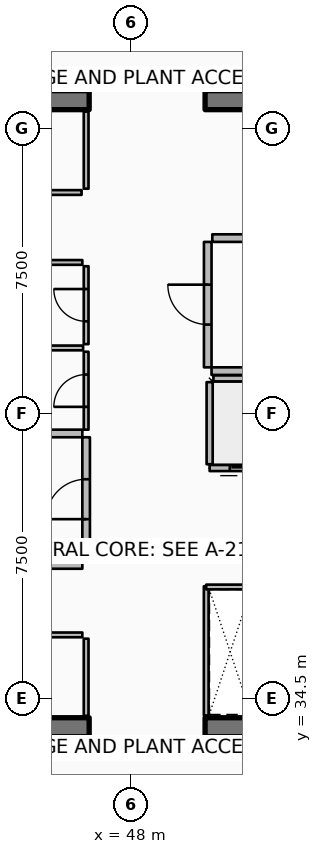
"""IFC4 building model, lengths in metres.
Left out: names, types, materials, properties, quantities, classifications, styles, units other than length and angle.
Written with IfcOpenShell. Run it as: python <this file> out.ifc"""

import sys

from ifc_helpers import new_model, si_unit, direction, frame, frame_2d, origin, place, context, subcontext, project, spatial, rectangle, extrude, element, fill, save


model = new_model("IFC4")
c1 = context("Model", 3, precision=1e-05, world=origin(), true_north=direction((0.0, 1.0)))
c2 = subcontext(c1, "Body", "Model", "MODEL_VIEW")
j1 = project(units=[si_unit("LENGTHUNIT", "METRE"), si_unit("PLANEANGLEUNIT", "RADIAN")], contexts=[c1])
p1 = place(None, origin())
s1 = spatial("IfcSite", under=j1, at=p1, CompositionType="ELEMENT")
p2 = place(p1, origin())
s2 = spatial("IfcBuilding", under=s1, at=p2, CompositionType="ELEMENT")
p3 = place(p2, frame((0.0, 0.0, 343.1)))
s3 = spatial("IfcBuildingStorey", under=s2, at=p3, CompositionType="ELEMENT", Elevation=343.1)
p4 = place(p3, frame((37.3, 33.75, 0.0), z_axis=(0.0, 0.0, 1.0), x_axis=(1.0, 0.0, 0.0)))
e1 = element("IfcWall", 1, at=p4, inside=s3, PredefinedType="SHEAR", context=c2, shape_type="SweptSolid", body=[
    extrude(rectangle(XDim=9.6, YDim=0.5, at=frame_2d((4.8, 0.0))), origin(), (0.0, 0.0, 1.0), 4.2),
])
p5 = place(p3, frame((49.95, 33.75, 0.0), z_axis=(0.0, 0.0, 1.0), x_axis=(1.0, 0.0, 0.0)))
e2 = element("IfcWall", 2, at=p5, inside=s3, PredefinedType="SHEAR", context=c2, shape_type="SweptSolid", body=[
    extrude(rectangle(XDim=9.6, YDim=0.5, at=frame_2d((4.8, 0.0))), origin(), (0.0, 0.0, 1.0), 4.2),
])
p6 = place(p3, frame((37.3, 50.25, 0.0), z_axis=(0.0, 0.0, 1.0), x_axis=(1.0, 0.0, 0.0)))
e3 = element("IfcWall", 3, at=p6, inside=s3, PredefinedType="SHEAR", context=c2, shape_type="SweptSolid", body=[
    extrude(rectangle(XDim=9.6, YDim=0.5, at=frame_2d((4.8, 0.0))), origin(), (0.0, 0.0, 1.0), 4.2),
])
p7 = place(p3, frame((49.95, 50.25, 0.0), z_axis=(0.0, 0.0, 1.0), x_axis=(1.0, 0.0, 0.0)))
e4 = element("IfcWall", 4, at=p7, inside=s3, PredefinedType="SHEAR", context=c2, shape_type="SweptSolid", body=[
    extrude(rectangle(XDim=9.6, YDim=0.5, at=frame_2d((4.8, 0.0))), origin(), (0.0, 0.0, 1.0), 4.2),
])
p8 = place(p3, frame((52.23, 40.57, 0.0), z_axis=(0.0, 0.0, 1.0), x_axis=(-1.0, 0.0, 0.0)))
e5 = element("IfcWall", 5, at=p8, inside=s3, PredefinedType="PARTITIONING", context=c2, shape_type="SweptSolid", body=[
    extrude(rectangle(XDim=2.16, YDim=0.16, at=frame_2d((1.08, 0.0))), origin(), (0.0, 0.0, 1.0), 3.94),
])
p9 = place(p8, frame((0.53, 0.0, 0.0)))
e6 = element("IfcOpeningElement", 6, at=p9, cuts=e5, PredefinedType="OPENING", context=c2, shape_type="SweptSolid", body=[
    extrude(rectangle(XDim=1.1, YDim=2.1, at=frame_2d((0.55, 1.05))), frame((0.0, 0.09, 0.0), z_axis=(0.0, -1.0, 0.0), x_axis=(1.0, 0.0, 0.0)), (0.0, 0.0, 1.0), 0.18),
])
p10 = place(p3, frame((50.07, 40.67, 0.0), z_axis=(0.0, 0.0, 1.0), x_axis=(0.0, 1.0, 0.0)))
e7 = element("IfcWall", 7, at=p10, inside=s3, PredefinedType="PARTITIONING", context=c2, shape_type="SweptSolid", body=[
    extrude(rectangle(XDim=2.16, YDim=0.16, at=frame_2d((1.08, 0.0))), origin(), (0.0, 0.0, 1.0), 3.94),
])
p11 = place(p3, frame((50.17, 42.93, 0.0), z_axis=(0.0, 0.0, 1.0), x_axis=(1.0, 0.0, 0.0)))
e8 = element("IfcWall", 8, at=p11, inside=s3, PredefinedType="PARTITIONING", context=c2, shape_type="SweptSolid", body=[
    extrude(rectangle(XDim=1.96, YDim=0.16, at=frame_2d((0.98, 0.0))), origin(), (0.0, 0.0, 1.0), 3.94),
])
p12 = place(p3, frame((46.82, 34.05, 0.0), z_axis=(0.0, 0.0, 1.0), x_axis=(0.0, 1.0, 0.0)))
e9 = element("IfcWall", 9, at=p12, inside=s3, PredefinedType="PARTITIONING", context=c2, shape_type="SweptSolid", body=[
    extrude(rectangle(XDim=2.03, YDim=0.125, at=frame_2d((1.015, 0.0))), origin(), (0.0, 0.0, 1.0), 3.38),
])
p13 = place(p3, frame((37.92, 36.18, 0.0), z_axis=(0.0, 0.0, 1.0), x_axis=(1.0, 0.0, 0.0)))
e10 = element("IfcWall", 10, at=p13, inside=s3, PredefinedType="PARTITIONING", context=c2, shape_type="SweptSolid", body=[
    extrude(rectangle(XDim=8.8, YDim=0.125, at=frame_2d((4.4, 0.0))), origin(), (0.0, 0.0, 1.0), 3.38),
])
p14 = place(p13, frame((3.975, 0.0, 0.0)))
e11 = element("IfcOpeningElement", 11, at=p14, cuts=e10, PredefinedType="OPENING", context=c2, shape_type="SweptSolid", body=[
    extrude(rectangle(XDim=0.85, YDim=2.06, at=frame_2d((0.425, 1.03))), frame((0.0, 0.073, 0.0), z_axis=(0.0, -1.0, 0.0), x_axis=(1.0, 0.0, 0.0)), (0.0, 0.0, 1.0), 0.145),
])
p15 = place(p3, frame((46.82, 47.92, 0.0), z_axis=(0.0, 0.0, 1.0), x_axis=(0.0, 1.0, 0.0)))
e12 = element("IfcWall", 12, at=p15, inside=s3, PredefinedType="PARTITIONING", context=c2, shape_type="SweptSolid", body=[
    extrude(rectangle(XDim=2.03, YDim=0.125, at=frame_2d((1.015, 0.0))), origin(), (0.0, 0.0, 1.0), 3.38),
])
p16 = place(p3, frame((42.2, 47.82, 0.0), z_axis=(0.0, 0.0, 1.0), x_axis=(1.0, 0.0, 0.0)))
e13 = element("IfcWall", 13, at=p16, inside=s3, PredefinedType="PARTITIONING", context=c2, shape_type="SweptSolid", body=[
    extrude(rectangle(XDim=4.5, YDim=0.125, at=frame_2d((2.25, 0.0))), origin(), (0.0, 0.0, 1.0), 3.38),
])
p17 = place(p16, frame((1.825, 0.0, 0.0)))
e14 = element("IfcOpeningElement", 14, at=p17, cuts=e13, PredefinedType="OPENING", context=c2, shape_type="SweptSolid", body=[
    extrude(rectangle(XDim=0.85, YDim=2.06, at=frame_2d((0.425, 1.03))), frame((0.0, 0.073, 0.0), z_axis=(0.0, -1.0, 0.0), x_axis=(1.0, 0.0, 0.0)), (0.0, 0.0, 1.0), 0.145),
])
p18 = place(p3, frame((41.35, 38.02, 0.0), z_axis=(0.0, 0.0, 1.0), x_axis=(1.0, 0.0, 0.0)))
e15 = element("IfcWall", 15, at=p18, inside=s3, PredefinedType="PARTITIONING", context=c2, shape_type="SweptSolid", body=[
    extrude(rectangle(XDim=5.37, YDim=0.2, at=frame_2d((2.685, 0.0))), origin(), (0.0, 0.0, 1.0), 3.94),
])
p19 = place(p3, frame((43.92, 41.48, 0.0), z_axis=(0.0, 0.0, 1.0), x_axis=(1.0, 0.0, 0.0)))
e16 = element("IfcWall", 16, at=p19, inside=s3, PredefinedType="PARTITIONING", context=c2, shape_type="SweptSolid", body=[
    extrude(rectangle(XDim=2.8, YDim=0.2, at=frame_2d((1.4, 0.0))), origin(), (0.0, 0.0, 1.0), 3.94),
])
p20 = place(p3, frame((46.82, 38.12, 0.0), z_axis=(0.0, 0.0, 1.0), x_axis=(0.0, 1.0, 0.0)))
e17 = element("IfcWall", 17, at=p20, inside=s3, PredefinedType="PARTITIONING", context=c2, shape_type="SweptSolid", body=[
    extrude(rectangle(XDim=3.26, YDim=0.2, at=frame_2d((1.63, 0.0))), origin(), (0.0, 0.0, 1.0), 3.94),
])
p21 = place(p20, frame((1.105, 0.0, 0.0)))
e18 = element("IfcOpeningElement", 18, at=p21, cuts=e17, PredefinedType="OPENING", context=c2, shape_type="SweptSolid", body=[
    extrude(rectangle(XDim=1.05, YDim=2.1, at=frame_2d((0.525, 1.05))), frame((0.0, 0.11, 0.0), z_axis=(0.0, -1.0, 0.0), x_axis=(1.0, 0.0, 0.0)), (0.0, 0.0, 1.0), 0.22),
])
p22 = place(p3, frame((50.12, 43.12, 0.0), z_axis=(0.0, 0.0, 1.0), x_axis=(1.0, 0.0, 0.0)))
e19 = element("IfcWall", 19, at=p22, inside=s3, PredefinedType="PARTITIONING", context=c2, shape_type="SweptSolid", body=[
    extrude(rectangle(XDim=8.88, YDim=0.2, at=frame_2d((4.44, 0.0))), origin(), (0.0, 0.0, 1.0), 3.94),
])
p23 = place(p3, frame((50.14, 46.62, 0.0), z_axis=(0.0, 0.0, 1.0), x_axis=(1.0, 0.0, 0.0)))
e20 = element("IfcWall", 20, at=p23, inside=s3, PredefinedType="PARTITIONING", context=c2, shape_type="SweptSolid", body=[
    extrude(rectangle(XDim=1.02, YDim=0.2, at=frame_2d((0.51, 0.0))), origin(), (0.0, 0.0, 1.0), 3.94),
])
p24 = place(p3, frame((50.02, 43.22, 0.0), z_axis=(0.0, 0.0, 1.0), x_axis=(0.0, 1.0, 0.0)))
e21 = element("IfcWall", 21, at=p24, inside=s3, PredefinedType="PARTITIONING", context=c2, shape_type="SweptSolid", body=[
    extrude(rectangle(XDim=3.3, YDim=0.2, at=frame_2d((1.65, 0.0))), origin(), (0.0, 0.0, 1.0), 3.94),
])
p25 = place(p24, frame((1.125, 0.0, 0.0)))
e22 = element("IfcOpeningElement", 22, at=p25, cuts=e21, PredefinedType="OPENING", context=c2, shape_type="SweptSolid", body=[
    extrude(rectangle(XDim=1.05, YDim=2.1, at=frame_2d((0.525, 1.05))), frame((0.0, 0.11, 0.0), z_axis=(0.0, -1.0, 0.0), x_axis=(1.0, 0.0, 0.0)), (0.0, 0.0, 1.0), 0.22),
])
p26 = place(p3, frame((41.36, 45.98, 0.0), z_axis=(0.0, 0.0, 1.0), x_axis=(1.0, 0.0, 0.0)))
e23 = element("IfcWall", 23, at=p26, inside=s3, PredefinedType="PARTITIONING", context=c2, shape_type="SweptSolid", body=[
    extrude(rectangle(XDim=5.36, YDim=0.125, at=frame_2d((2.68, 0.0))), origin(), (0.0, 0.0, 1.0), 3.38),
])
p27 = place(p3, frame((49.98, 34.06, 0.0), z_axis=(0.0, 0.0, 1.0), x_axis=(0.0, 1.0, 0.0)))
e24 = element("IfcWall", 24, at=p27, inside=s3, PredefinedType="PARTITIONING", context=c2, shape_type="SweptSolid", body=[
    extrude(rectangle(XDim=3.4, YDim=0.125, at=frame_2d((1.7, 0.0))), origin(), (0.0, 0.0, 1.0), 3.38),
])
p28 = place(p3, frame((49.98, 37.44, 0.0), z_axis=(0.0, 0.0, 1.0), x_axis=(1.0, 0.0, 0.0)))
e25 = element("IfcWall", 25, at=p28, inside=s3, PredefinedType="PARTITIONING", context=c2, shape_type="SweptSolid", body=[
    extrude(rectangle(XDim=1.26, YDim=0.125, at=frame_2d((0.63, 0.0))), origin(), (0.0, 0.0, 1.0), 3.38),
])
p29 = place(p3, frame((44.03, 43.73, 0.0), z_axis=(0.0, 0.0, 1.0), x_axis=(1.0, 0.0, 0.0)))
e26 = element("IfcWall", 26, at=p29, inside=s3, PredefinedType="PARTITIONING", context=c2, shape_type="SweptSolid", body=[
    extrude(rectangle(XDim=2.71, YDim=0.125, at=frame_2d((1.355, 0.0))), origin(), (0.0, 0.0, 1.0), 3.38),
])
p30 = place(p3, frame((46.82, 41.58, 0.0), z_axis=(0.0, 0.0, 1.0), x_axis=(0.0, 1.0, 0.0)))
e27 = element("IfcWall", 27, at=p30, inside=s3, PredefinedType="PARTITIONING", context=c2, shape_type="SweptSolid", body=[
    extrude(rectangle(XDim=2.05, YDim=0.125, at=frame_2d((1.025, 0.0))), origin(), (0.0, 0.0, 1.0), 3.38),
])
p31 = place(p30, frame((0.6, 0.0, 0.0)))
e28 = element("IfcOpeningElement", 28, at=p31, cuts=e27, PredefinedType="OPENING", context=c2, shape_type="SweptSolid", body=[
    extrude(rectangle(XDim=0.85, YDim=2.06, at=frame_2d((0.425, 1.03))), frame((0.0, 0.073, 0.0), z_axis=(0.0, -1.0, 0.0), x_axis=(1.0, 0.0, 0.0)), (0.0, 0.0, 1.0), 0.145),
])
p32 = place(p3, frame((46.82, 43.83, 0.0), z_axis=(0.0, 0.0, 1.0), x_axis=(0.0, 1.0, 0.0)))
e29 = element("IfcWall", 29, at=p32, inside=s3, PredefinedType="PARTITIONING", context=c2, shape_type="SweptSolid", body=[
    extrude(rectangle(XDim=2.05, YDim=0.125, at=frame_2d((1.025, 0.0))), origin(), (0.0, 0.0, 1.0), 3.38),
])
p33 = place(p32, frame((0.6, 0.0, 0.0)))
e30 = element("IfcOpeningElement", 30, at=p33, cuts=e29, PredefinedType="OPENING", context=c2, shape_type="SweptSolid", body=[
    extrude(rectangle(XDim=0.85, YDim=2.06, at=frame_2d((0.425, 1.03))), frame((0.0, 0.073, 0.0), z_axis=(0.0, -1.0, 0.0), x_axis=(1.0, 0.0, 0.0)), (0.0, 0.0, 1.0), 0.145),
])
p34 = place(p9, origin())
e31 = element("IfcDoor", 31, at=p34, inside=s3, OperationType="DOUBLE_DOOR_SLIDING", PredefinedType="DOOR", context=c2, shape_type="SweptSolid", body=[
    extrude(rectangle(XDim=1.1, YDim=2.1, at=frame_2d((0.55, 1.05))), frame((0.0, 0.025, 0.0), z_axis=(0.0, -1.0, 0.0), x_axis=(1.0, 0.0, 0.0)), (0.0, 0.0, 1.0), 0.05),
])
fill(e6, e31)
p35 = place(p21, origin())
e32 = element("IfcDoor", 32, at=p35, inside=s3, OperationType="SINGLE_SWING_LEFT", PredefinedType="DOOR", context=c2, shape_type="SweptSolid", body=[
    extrude(rectangle(XDim=1.05, YDim=2.1, at=frame_2d((0.525, 1.05))), frame((0.0, 0.025, 0.0), z_axis=(0.0, -1.0, 0.0), x_axis=(1.0, 0.0, 0.0)), (0.0, 0.0, 1.0), 0.05),
])
fill(e18, e32)
p36 = place(p25, origin())
e33 = element("IfcDoor", 33, at=p36, inside=s3, OperationType="SINGLE_SWING_RIGHT", PredefinedType="DOOR", context=c2, shape_type="SweptSolid", body=[
    extrude(rectangle(XDim=1.05, YDim=2.1, at=frame_2d((0.525, 1.05))), frame((0.0, 0.025, 0.0), z_axis=(0.0, -1.0, 0.0), x_axis=(1.0, 0.0, 0.0)), (0.0, 0.0, 1.0), 0.05),
])
fill(e22, e33)
p37 = place(p31, origin())
e34 = element("IfcDoor", 34, at=p37, inside=s3, OperationType="SINGLE_SWING_LEFT", PredefinedType="DOOR", context=c2, shape_type="SweptSolid", body=[
    extrude(rectangle(XDim=0.85, YDim=2.06, at=frame_2d((0.425, 1.03))), frame((0.0, 0.025, 0.0), z_axis=(0.0, -1.0, 0.0), x_axis=(1.0, 0.0, 0.0)), (0.0, 0.0, 1.0), 0.05),
])
fill(e28, e34)
p38 = place(p33, origin())
e35 = element("IfcDoor", 35, at=p38, inside=s3, OperationType="SINGLE_SWING_RIGHT", PredefinedType="DOOR", context=c2, shape_type="SweptSolid", body=[
    extrude(rectangle(XDim=0.85, YDim=2.06, at=frame_2d((0.425, 1.03))), frame((0.0, 0.025, 0.0), z_axis=(0.0, -1.0, 0.0), x_axis=(1.0, 0.0, 0.0)), (0.0, 0.0, 1.0), 0.05),
])
fill(e30, e35)
save(model, sys.argv[1])
